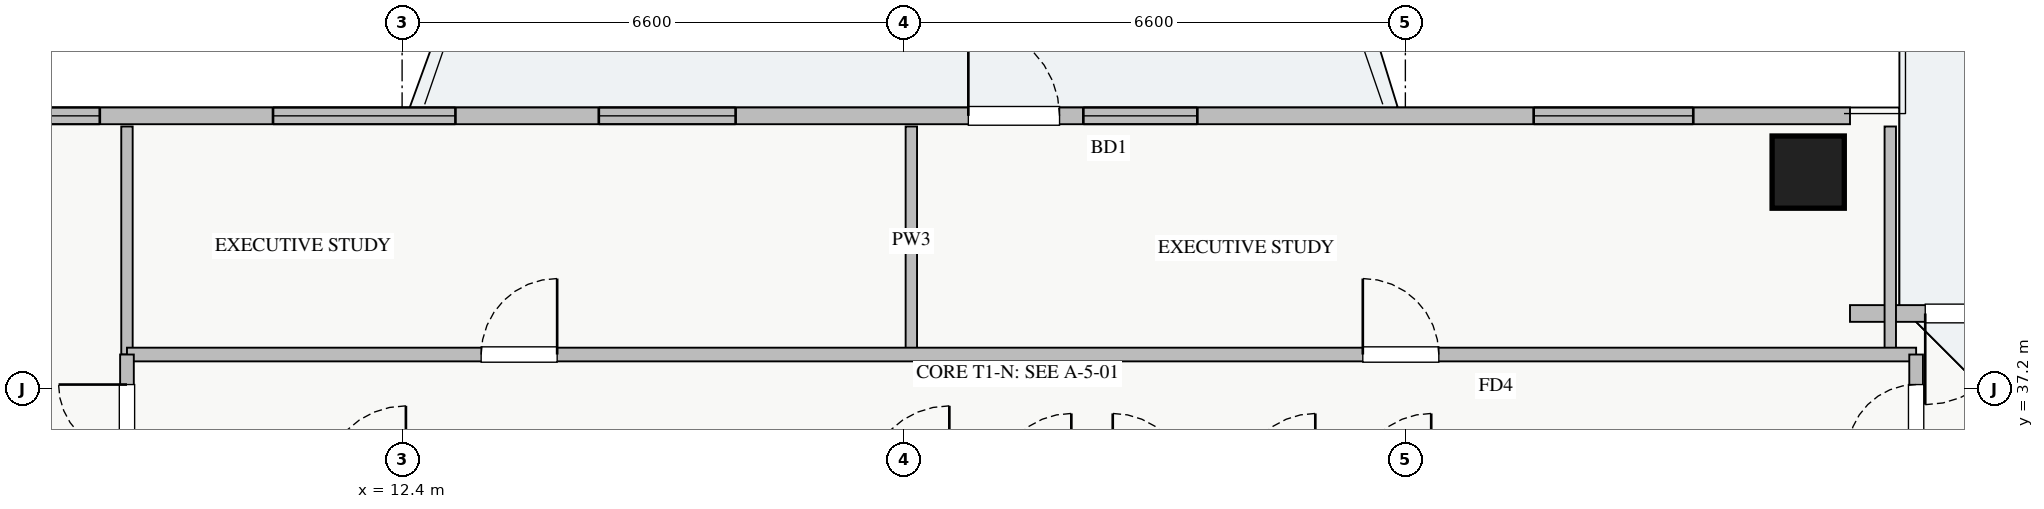
"""IFC4 building model, lengths in metres.
Left out: names, types, materials, properties, quantities, classifications, styles, units other than length and angle.
Written with IfcOpenShell. Run it as: python <this file> out.ifc"""

import sys

from ifc_helpers import new_model, si_unit, direction, frame, frame_2d, origin, origin_2d, place, context, subcontext, project, spatial, rectangle, extrude, source, transform, mapped, element, fill, save


model = new_model("IFC4")
c1 = context("Model", 3, precision=1e-05, world=origin(), true_north=direction((0.0, 1.0)))
c2 = subcontext(c1, "Body", "Model", "MODEL_VIEW")
j1 = project(units=[si_unit("LENGTHUNIT", "METRE"), si_unit("PLANEANGLEUNIT", "RADIAN")], contexts=[c1])
p1 = place(None, origin())
s1 = spatial("IfcSite", under=j1, at=p1, CompositionType="ELEMENT")
p2 = place(p1, origin())
s2 = spatial("IfcBuilding", under=s1, at=p2, CompositionType="ELEMENT")
p3 = place(p2, frame((0.0, 0.0, 173.0)))
s3 = spatial("IfcBuildingStorey", under=s2, at=p3, CompositionType="ELEMENT", Elevation=173.0)
m1 = source(origin(), c2, "Body", "SweptSolid", [
    extrude(rectangle(XDim=0.95, YDim=0.95, at=origin_2d()), origin(), (0.0, 0.0, 1.0), 3.25),
])
p4 = place(p3, frame((30.9, 40.05, 0.0), z_axis=(0.0, 0.0, 1.0), x_axis=(1.0, 0.0, 0.0)))
e1 = element("IfcColumn", 1, at=p4, inside=s3, PredefinedType="COLUMN", context=c2, shape_type="MappedRepresentation", body=[
    mapped(m1, transform((0.0, 0.0, 0.0), x_axis=(1.0, 0.0, 0.0), y_axis=(0.0, 1.0, 0.0), z_axis=(0.0, 0.0, 1.0), scale=1.0)),
])
p5 = place(p3, frame((6.55, 40.79, 0.0), z_axis=(0.0, 0.0, 1.0), x_axis=(1.0, 0.0, 0.0)))
e2 = element("IfcWall", 2, at=p5, inside=s3, PredefinedType="STANDARD", context=c2, shape_type="SweptSolid", body=[
    extrude(rectangle(XDim=24.9, YDim=0.22, at=frame_2d((12.45, 0.0))), origin(), (0.0, 0.0, 1.0), 2.54),
])
p6 = place(p5, frame((13.3, 0.0, 0.0)))
e3 = element("IfcOpeningElement", 3, at=p6, cuts=e2, PredefinedType="OPENING", context=c2, shape_type="SweptSolid", body=[
    extrude(rectangle(XDim=1.2, YDim=2.1, at=frame_2d((0.6, 1.05))), frame((0.0, 0.12, 0.0), z_axis=(0.0, -1.0, 0.0), x_axis=(1.0, 0.0, 0.0)), (0.0, 0.0, 1.0), 0.24),
])
p7 = place(p5, frame((0.373, 0.0, 0.9)))
e4 = element("IfcOpeningElement", 4, at=p7, cuts=e2, PredefinedType="OPENING", context=c2, shape_type="SweptSolid", body=[
    extrude(rectangle(XDim=1.5, YDim=1.5, at=frame_2d((0.75, 0.75))), frame((0.0, 0.12, 0.0), z_axis=(0.0, -1.0, 0.0), x_axis=(1.0, 0.0, 0.0)), (0.0, 0.0, 1.0), 0.24),
])
p8 = place(p5, frame((8.438, 0.0, 0.9)))
e5 = element("IfcOpeningElement", 5, at=p8, cuts=e2, PredefinedType="OPENING", context=c2, shape_type="SweptSolid", body=[
    extrude(rectangle(XDim=1.8, YDim=1.45, at=frame_2d((0.9, 0.725))), frame((0.0, 0.12, 0.0), z_axis=(0.0, -1.0, 0.0), x_axis=(1.0, 0.0, 0.0)), (0.0, 0.0, 1.0), 0.24),
])
p9 = place(p5, frame((14.813, 0.0, 0.9)))
e6 = element("IfcOpeningElement", 6, at=p9, cuts=e2, PredefinedType="OPENING", context=c2, shape_type="SweptSolid", body=[
    extrude(rectangle(XDim=1.5, YDim=1.45, at=frame_2d((0.75, 0.725))), frame((0.0, 0.12, 0.0), z_axis=(0.0, -1.0, 0.0), x_axis=(1.0, 0.0, 0.0)), (0.0, 0.0, 1.0), 0.24),
])
p10 = place(p5, frame((20.738, 0.0, 0.9)))
e7 = element("IfcOpeningElement", 7, at=p10, cuts=e2, PredefinedType="OPENING", context=c2, shape_type="SweptSolid", body=[
    extrude(rectangle(XDim=2.1, YDim=1.46, at=frame_2d((1.05, 0.73))), frame((0.0, 0.12, 0.0), z_axis=(0.0, -1.0, 0.0), x_axis=(1.0, 0.0, 0.0)), (0.0, 0.0, 1.0), 0.24),
])
p11 = place(p5, frame((4.152, 0.0, 0.9)))
e8 = element("IfcOpeningElement", 8, at=p11, cuts=e2, PredefinedType="OPENING", context=c2, shape_type="SweptSolid", body=[
    extrude(rectangle(XDim=2.4, YDim=1.5, at=frame_2d((1.2, 0.75))), frame((0.0, 0.12, 0.0), z_axis=(0.0, -1.0, 0.0), x_axis=(1.0, 0.0, 0.0)), (0.0, 0.0, 1.0), 0.24),
])
p12 = place(p3, frame((31.45, 38.19, 0.0), z_axis=(0.0, 0.0, 1.0), x_axis=(1.0, 0.0, 0.0)))
e9 = element("IfcWall", 9, at=p12, inside=s3, PredefinedType="STANDARD", context=c2, shape_type="SweptSolid", body=[
    extrude(rectangle(XDim=2.74, YDim=0.22, at=frame_2d((1.37, 0.0))), origin(), (0.0, 0.0, 1.0), 2.54),
])
p13 = place(p12, frame((0.99, 0.0, 0.0)))
e10 = element("IfcOpeningElement", 10, at=p13, cuts=e9, PredefinedType="OPENING", context=c2, shape_type="SweptSolid", body=[
    extrude(rectangle(XDim=1.2, YDim=2.1, at=frame_2d((0.6, 1.05))), frame((0.0, 0.12, 0.0), z_axis=(0.0, -1.0, 0.0), x_axis=(1.0, 0.0, 0.0)), (0.0, 0.0, 1.0), 0.24),
])
p14 = place(p3, frame((19.1, 37.65, 0.0), z_axis=(0.0, 0.0, 1.0), x_axis=(0.0, 1.0, 0.0)))
e11 = element("IfcWall", 11, at=p14, inside=s3, PredefinedType="PARTITIONING", context=c2, shape_type="SweptSolid", body=[
    extrude(rectangle(XDim=3.0, YDim=0.15, at=frame_2d((1.5, 0.0))), origin(), (0.0, 0.0, 1.0), 2.701),
])
for number, where, z_axis, x_axis in (
    (12, (8.78, 37.65, 0.0), (0.0, 0.0, 1.0), (0.0, 1.0, 0.0)),
    (13, (31.98, 37.65, 0.0), (0.0, 0.0, 1.0), (0.0, 1.0, 0.0)),
):
    element("IfcWall", number, at=place(p3, frame(where, z_axis=z_axis, x_axis=x_axis)), inside=s3, PredefinedType="PARTITIONING", context=c2, shape_type="SweptSolid", body=[
        extrude(rectangle(XDim=3.0, YDim=0.15, at=frame_2d((1.5, 0.0))), origin(), (0.0, 0.0, 1.0), 3.0),
    ])
p15 = place(p3, frame((8.78, 37.65, 0.0), z_axis=(0.0, 0.0, 1.0), x_axis=(1.0, 0.0, 0.0)))
e14 = element("IfcWall", 14, at=p15, inside=s3, PredefinedType="PARTITIONING", context=c2, shape_type="SweptSolid", body=[
    extrude(rectangle(XDim=23.54, YDim=0.18, at=frame_2d((11.77, 0.0))), origin(), (0.0, 0.0, 1.0), 3.0),
])
p16 = place(p15, frame((4.66, 0.0, 0.0)))
e15 = element("IfcOpeningElement", 15, at=p16, cuts=e14, PredefinedType="OPENING", context=c2, shape_type="SweptSolid", body=[
    extrude(rectangle(XDim=1.0, YDim=2.05, at=frame_2d((0.5, 1.025))), frame((0.0, 0.1, 0.0), z_axis=(0.0, -1.0, 0.0), x_axis=(1.0, 0.0, 0.0)), (0.0, 0.0, 1.0), 0.2),
])
p17 = place(p15, frame((16.26, 0.0, 0.0)))
e16 = element("IfcOpeningElement", 16, at=p17, cuts=e14, PredefinedType="OPENING", context=c2, shape_type="SweptSolid", body=[
    extrude(rectangle(XDim=1.0, YDim=2.05, at=frame_2d((0.5, 1.025))), frame((0.0, 0.1, 0.0), z_axis=(0.0, -1.0, 0.0), x_axis=(1.0, 0.0, 0.0)), (0.0, 0.0, 1.0), 0.2),
])
p18 = place(p3, frame((8.78, 8.31, 0.0), z_axis=(0.0, 0.0, 1.0), x_axis=(0.0, 1.0, 0.0)))
e17 = element("IfcWall", 17, at=p18, inside=s3, PredefinedType="PARTITIONING", context=c2, shape_type="SweptSolid", body=[
    extrude(rectangle(XDim=29.34, YDim=0.18, at=frame_2d((14.67, 0.0))), origin(), (0.0, 0.0, 1.0), 3.0),
])
p19 = place(p18, frame((28.045, 0.0, 0.0)))
e18 = element("IfcOpeningElement", 18, at=p19, cuts=e17, PredefinedType="OPENING", context=c2, shape_type="SweptSolid", body=[
    extrude(rectangle(XDim=0.9, YDim=2.05, at=frame_2d((0.45, 1.025))), frame((0.0, 0.1, 0.0), z_axis=(0.0, -1.0, 0.0), x_axis=(1.0, 0.0, 0.0)), (0.0, 0.0, 1.0), 0.2),
])
p20 = place(p18, frame((0.24, 0.0, 0.0)))
e19 = element("IfcOpeningElement", 19, at=p20, cuts=e17, PredefinedType="OPENING", context=c2, shape_type="SweptSolid", body=[
    extrude(rectangle(XDim=0.9, YDim=2.05, at=frame_2d((0.45, 1.025))), frame((0.0, 0.1, 0.0), z_axis=(0.0, -1.0, 0.0), x_axis=(1.0, 0.0, 0.0)), (0.0, 0.0, 1.0), 0.2),
])
p21 = place(p18, frame((7.705, 0.0, 0.0)))
e20 = element("IfcOpeningElement", 20, at=p21, cuts=e17, PredefinedType="OPENING", context=c2, shape_type="SweptSolid", body=[
    extrude(rectangle(XDim=1.0, YDim=2.05, at=frame_2d((0.5, 1.025))), frame((0.0, 0.1, 0.0), z_axis=(0.0, -1.0, 0.0), x_axis=(1.0, 0.0, 0.0)), (0.0, 0.0, 1.0), 0.2),
])
p22 = place(p18, frame((17.39, 0.0, 0.0)))
e21 = element("IfcOpeningElement", 21, at=p22, cuts=e17, PredefinedType="OPENING", context=c2, shape_type="SweptSolid", body=[
    extrude(rectangle(XDim=1.0, YDim=2.05, at=frame_2d((0.5, 1.025))), frame((0.0, 0.1, 0.0), z_axis=(0.0, -1.0, 0.0), x_axis=(1.0, 0.0, 0.0)), (0.0, 0.0, 1.0), 0.2),
])
p23 = place(p3, frame((32.32, 8.31, 0.0), z_axis=(0.0, 0.0, 1.0), x_axis=(0.0, 1.0, 0.0)))
e22 = element("IfcWall", 22, at=p23, inside=s3, PredefinedType="PARTITIONING", context=c2, shape_type="SweptSolid", body=[
    extrude(rectangle(XDim=29.34, YDim=0.18, at=frame_2d((14.67, 0.0))), origin(), (0.0, 0.0, 1.0), 3.0),
])
p24 = place(p23, frame((28.045, 0.0, 0.0)))
e23 = element("IfcOpeningElement", 23, at=p24, cuts=e22, PredefinedType="OPENING", context=c2, shape_type="SweptSolid", body=[
    extrude(rectangle(XDim=0.9, YDim=2.05, at=frame_2d((0.45, 1.025))), frame((0.0, 0.1, 0.0), z_axis=(0.0, -1.0, 0.0), x_axis=(1.0, 0.0, 0.0)), (0.0, 0.0, 1.0), 0.2),
])
p25 = place(p23, frame((0.415, 0.0, 0.0)))
e24 = element("IfcOpeningElement", 24, at=p25, cuts=e22, PredefinedType="OPENING", context=c2, shape_type="SweptSolid", body=[
    extrude(rectangle(XDim=0.9, YDim=2.05, at=frame_2d((0.45, 1.025))), frame((0.0, 0.1, 0.0), z_axis=(0.0, -1.0, 0.0), x_axis=(1.0, 0.0, 0.0)), (0.0, 0.0, 1.0), 0.2),
])
p26 = place(p23, frame((5.325, 0.0, 0.0)))
e25 = element("IfcOpeningElement", 25, at=p26, cuts=e22, PredefinedType="OPENING", context=c2, shape_type="SweptSolid", body=[
    extrude(rectangle(XDim=1.0, YDim=2.05, at=frame_2d((0.5, 1.025))), frame((0.0, 0.1, 0.0), z_axis=(0.0, -1.0, 0.0), x_axis=(1.0, 0.0, 0.0)), (0.0, 0.0, 1.0), 0.2),
])
p27 = place(p23, frame((14.095, 0.0, 0.0)))
e26 = element("IfcOpeningElement", 26, at=p27, cuts=e22, PredefinedType="OPENING", context=c2, shape_type="SweptSolid", body=[
    extrude(rectangle(XDim=1.0, YDim=2.05, at=frame_2d((0.5, 1.025))), frame((0.0, 0.1, 0.0), z_axis=(0.0, -1.0, 0.0), x_axis=(1.0, 0.0, 0.0)), (0.0, 0.0, 1.0), 0.2),
])
p28 = place(p23, frame((22.96, 0.0, 0.0)))
e27 = element("IfcOpeningElement", 27, at=p28, cuts=e22, PredefinedType="OPENING", context=c2, shape_type="SweptSolid", body=[
    extrude(rectangle(XDim=1.0, YDim=2.05, at=frame_2d((0.5, 1.025))), frame((0.0, 0.1, 0.0), z_axis=(0.0, -1.0, 0.0), x_axis=(1.0, 0.0, 0.0)), (0.0, 0.0, 1.0), 0.2),
])
m2 = source(origin(), c2, "Body", "SweptSolid", [
    extrude(rectangle(XDim=1.2, YDim=2.1, at=frame_2d((0.6, 1.05))), frame((0.0, 0.025, 0.0), z_axis=(0.0, -1.0, 0.0), x_axis=(1.0, 0.0, 0.0)), (0.0, 0.0, 1.0), 0.05),
])
p29 = place(p6, origin())
e28 = element("IfcDoor", 28, at=p29, inside=s3, OperationType="SINGLE_SWING_LEFT", PredefinedType="DOOR", context=c2, shape_type="MappedRepresentation", body=[
    mapped(m2, transform((0.0, 0.0, 0.0), x_axis=(1.0, 0.0, 0.0), y_axis=(0.0, 1.0, 0.0), z_axis=(0.0, 0.0, 1.0), scale=1.0)),
])
fill(e3, e28)
m3 = source(origin(), c2, "Body", "SweptSolid", [
    extrude(rectangle(XDim=1.5, YDim=1.5, at=frame_2d((0.75, 0.75))), frame((0.0, 0.03, 0.0), z_axis=(0.0, -1.0, 0.0), x_axis=(1.0, 0.0, 0.0)), (0.0, 0.0, 1.0), 0.06),
])
p30 = place(p7, origin())
e29 = element("IfcWindow", 29, at=p30, inside=s3, PartitioningType="TRIPLE_PANEL_VERTICAL", PredefinedType="WINDOW", context=c2, shape_type="MappedRepresentation", body=[
    mapped(m3, transform((0.0, 0.0, 0.0), x_axis=(1.0, 0.0, 0.0), y_axis=(0.0, 1.0, 0.0), z_axis=(0.0, 0.0, 1.0), scale=1.0)),
])
fill(e4, e29)
m4 = source(origin(), c2, "Body", "SweptSolid", [
    extrude(rectangle(XDim=1.8, YDim=1.45, at=frame_2d((0.9, 0.725))), frame((0.0, 0.03, 0.0), z_axis=(0.0, -1.0, 0.0), x_axis=(1.0, 0.0, 0.0)), (0.0, 0.0, 1.0), 0.06),
])
p31 = place(p8, origin())
e30 = element("IfcWindow", 30, at=p31, inside=s3, PartitioningType="DOUBLE_PANEL_VERTICAL", PredefinedType="WINDOW", context=c2, shape_type="MappedRepresentation", body=[
    mapped(m4, transform((0.0, 0.0, 0.0), x_axis=(1.0, 0.0, 0.0), y_axis=(0.0, 1.0, 0.0), z_axis=(0.0, 0.0, 1.0), scale=1.0)),
])
fill(e5, e30)
m5 = source(origin(), c2, "Body", "SweptSolid", [
    extrude(rectangle(XDim=1.5, YDim=1.45, at=frame_2d((0.75, 0.725))), frame((0.0, 0.03, 0.0), z_axis=(0.0, -1.0, 0.0), x_axis=(1.0, 0.0, 0.0)), (0.0, 0.0, 1.0), 0.06),
])
p32 = place(p9, origin())
e31 = element("IfcWindow", 31, at=p32, inside=s3, PartitioningType="DOUBLE_PANEL_VERTICAL", PredefinedType="WINDOW", context=c2, shape_type="MappedRepresentation", body=[
    mapped(m5, transform((0.0, 0.0, 0.0), x_axis=(1.0, 0.0, 0.0), y_axis=(0.0, 1.0, 0.0), z_axis=(0.0, 0.0, 1.0), scale=1.0)),
])
fill(e6, e31)
m6 = source(origin(), c2, "Body", "SweptSolid", [
    extrude(rectangle(XDim=2.1, YDim=1.46, at=frame_2d((1.05, 0.73))), frame((0.0, 0.03, 0.0), z_axis=(0.0, -1.0, 0.0), x_axis=(1.0, 0.0, 0.0)), (0.0, 0.0, 1.0), 0.06),
])
p33 = place(p10, origin())
e32 = element("IfcWindow", 32, at=p33, inside=s3, PartitioningType="TRIPLE_PANEL_VERTICAL", PredefinedType="WINDOW", context=c2, shape_type="MappedRepresentation", body=[
    mapped(m6, transform((0.0, 0.0, 0.0), x_axis=(1.0, 0.0, 0.0), y_axis=(0.0, 1.0, 0.0), z_axis=(0.0, 0.0, 1.0), scale=1.0)),
])
fill(e7, e32)
p34 = place(p13, frame((1.2, 0.0, 0.0), z_axis=(0.0, 0.0, 1.0), x_axis=(-1.0, 0.0, 0.0)))
e33 = element("IfcDoor", 33, at=p34, inside=s3, OperationType="SINGLE_SWING_LEFT", PredefinedType="DOOR", context=c2, shape_type="MappedRepresentation", body=[
    mapped(m2, transform((0.0, 0.0, 0.0), x_axis=(1.0, 0.0, 0.0), y_axis=(0.0, 1.0, 0.0), z_axis=(0.0, 0.0, 1.0), scale=1.0)),
])
fill(e10, e33)
m7 = source(origin(), c2, "Body", "SweptSolid", [
    extrude(rectangle(XDim=1.0, YDim=2.05, at=frame_2d((0.5, 1.025))), frame((0.0, 0.025, 0.0), z_axis=(0.0, -1.0, 0.0), x_axis=(1.0, 0.0, 0.0)), (0.0, 0.0, 1.0), 0.05),
])
p35 = place(p16, origin())
e34 = element("IfcDoor", 34, at=p35, inside=s3, OperationType="SINGLE_SWING_RIGHT", PredefinedType="DOOR", context=c2, shape_type="MappedRepresentation", body=[
    mapped(m7, transform((0.0, 0.0, 0.0), x_axis=(1.0, 0.0, 0.0), y_axis=(0.0, 1.0, 0.0), z_axis=(0.0, 0.0, 1.0), scale=1.0)),
])
fill(e15, e34)
p36 = place(p17, origin())
e35 = element("IfcDoor", 35, at=p36, inside=s3, OperationType="SINGLE_SWING_LEFT", PredefinedType="DOOR", context=c2, shape_type="MappedRepresentation", body=[
    mapped(m7, transform((0.0, 0.0, 0.0), x_axis=(1.0, 0.0, 0.0), y_axis=(0.0, 1.0, 0.0), z_axis=(0.0, 0.0, 1.0), scale=1.0)),
])
fill(e16, e35)
m8 = source(origin(), c2, "Body", "SweptSolid", [
    extrude(rectangle(XDim=0.9, YDim=2.05, at=frame_2d((0.45, 1.025))), frame((0.0, 0.025, 0.0), z_axis=(0.0, -1.0, 0.0), x_axis=(1.0, 0.0, 0.0)), (0.0, 0.0, 1.0), 0.05),
])
p37 = place(p19, origin())
e36 = element("IfcDoor", 36, at=p37, inside=s3, OperationType="SINGLE_SWING_RIGHT", PredefinedType="DOOR", context=c2, shape_type="MappedRepresentation", body=[
    mapped(m8, transform((0.0, 0.0, 0.0), x_axis=(1.0, 0.0, 0.0), y_axis=(0.0, 1.0, 0.0), z_axis=(0.0, 0.0, 1.0), scale=1.0)),
])
fill(e18, e36)
p38 = place(p24, origin())
e37 = element("IfcDoor", 37, at=p38, inside=s3, OperationType="SINGLE_SWING_LEFT", PredefinedType="DOOR", context=c2, shape_type="MappedRepresentation", body=[
    mapped(m8, transform((0.0, 0.0, 0.0), x_axis=(1.0, 0.0, 0.0), y_axis=(0.0, 1.0, 0.0), z_axis=(0.0, 0.0, 1.0), scale=1.0)),
])
fill(e23, e37)
m9 = source(origin(), c2, "Body", "SweptSolid", [
    extrude(rectangle(XDim=2.4, YDim=1.5, at=frame_2d((1.2, 0.75))), frame((0.0, 0.03, 0.0), z_axis=(0.0, -1.0, 0.0), x_axis=(1.0, 0.0, 0.0)), (0.0, 0.0, 1.0), 0.06),
])
p39 = place(p11, origin())
e38 = element("IfcWindow", 38, at=p39, inside=s3, PartitioningType="TRIPLE_PANEL_VERTICAL", PredefinedType="WINDOW", context=c2, shape_type="MappedRepresentation", body=[
    mapped(m9, transform((0.0, 0.0, 0.0), x_axis=(1.0, 0.0, 0.0), y_axis=(0.0, 1.0, 0.0), z_axis=(0.0, 0.0, 1.0), scale=1.0)),
])
fill(e8, e38)
save(model, sys.argv[1])
